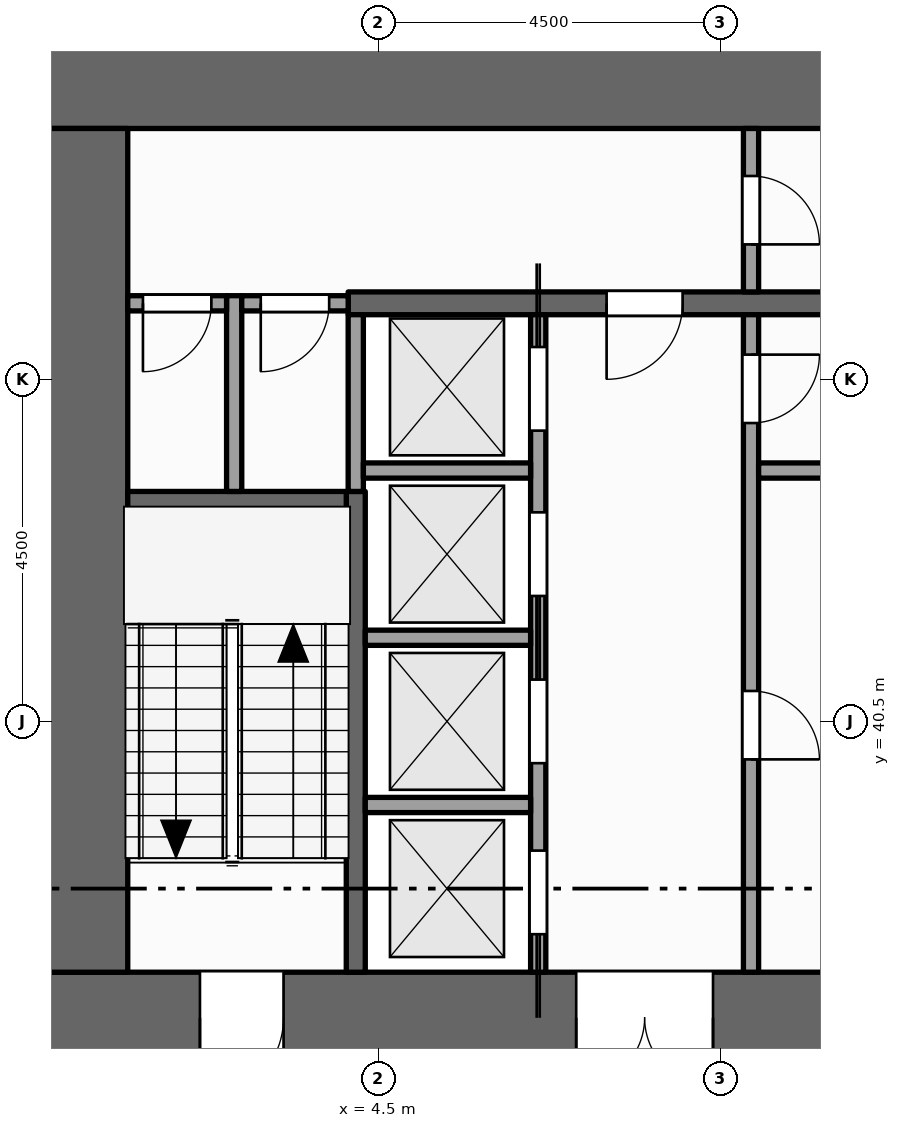
"""IFC4 building model, lengths in metres.
Left out: names, types, materials, properties, quantities, classifications, styles, units other than length and angle.
Written with IfcOpenShell. Run it as: python <this file> out.ifc"""

import sys

from ifc_helpers import new_model, si_unit, direction, frame, frame_2d, origin, place, context, subcontext, project, spatial, rectangle, extrude, element, fill, save


model = new_model("IFC4")
c1 = context("Model", 3, precision=1e-05, world=origin(), true_north=direction((0.0, 1.0)))
c2 = subcontext(c1, "Body", "Model", "MODEL_VIEW")
j1 = project(units=[si_unit("LENGTHUNIT", "METRE"), si_unit("PLANEANGLEUNIT", "RADIAN")], contexts=[c1])
p1 = place(None, origin())
s1 = spatial("IfcSite", under=j1, at=p1, CompositionType="ELEMENT")
p2 = place(p1, origin())
s2 = spatial("IfcBuilding", under=s1, at=p2, CompositionType="ELEMENT")
p3 = place(p2, frame((0.0, 0.0, 119.0)))
s3 = spatial("IfcBuildingStorey", under=s2, at=p3, CompositionType="ELEMENT", Elevation=119.0)
p4 = place(p3, frame((0.0, 36.6, -0.15), z_axis=(0.0, 0.0, 1.0), x_axis=(1.0, 0.0, 0.0)))
e1 = element("IfcWall", 1, at=p4, inside=s3, PredefinedType="SHEAR", context=c2, shape_type="SweptSolid", body=[
    extrude(rectangle(XDim=22.5, YDim=1.2, at=frame_2d((11.25, 0.0))), origin(), (0.0, 0.0, 1.0), 4.0),
])
p5 = place(p4, frame((7.1, 0.0, 0.15)))
e2 = element("IfcOpeningElement", 2, at=p5, cuts=e1, PredefinedType="OPENING", context=c2, shape_type="SweptSolid", body=[
    extrude(rectangle(XDim=1.8, YDim=2.1, at=frame_2d((0.9, 1.05))), frame((0.0, 0.61, 0.0), z_axis=(0.0, -1.0, 0.0), x_axis=(1.0, 0.0, 0.0)), (0.0, 0.0, 1.0), 1.22),
])
p6 = place(p4, frame((13.15, 0.0, 0.15)))
e3 = element("IfcOpeningElement", 3, at=p6, cuts=e1, PredefinedType="OPENING", context=c2, shape_type="SweptSolid", body=[
    extrude(rectangle(XDim=1.1, YDim=2.1, at=frame_2d((0.55, 1.05))), frame((0.0, 0.61, 0.0), z_axis=(0.0, -1.0, 0.0), x_axis=(1.0, 0.0, 0.0)), (0.0, 0.0, 1.0), 1.22),
])
p7 = place(p4, frame((2.15, 0.0, 0.15)))
e4 = element("IfcOpeningElement", 4, at=p7, cuts=e1, PredefinedType="OPENING", context=c2, shape_type="SweptSolid", body=[
    extrude(rectangle(XDim=1.1, YDim=2.1, at=frame_2d((0.55, 1.05))), frame((0.0, 0.61, 0.0), z_axis=(0.0, -1.0, 0.0), x_axis=(1.0, 0.0, 0.0)), (0.0, 0.0, 1.0), 1.22),
])
p8 = place(p4, frame((19.35, 0.0, 0.15)))
e5 = element("IfcOpeningElement", 5, at=p8, cuts=e1, PredefinedType="OPENING", context=c2, shape_type="SweptSolid", body=[
    extrude(rectangle(XDim=1.1, YDim=2.1, at=frame_2d((0.55, 1.05))), frame((0.0, 0.61, 0.0), z_axis=(0.0, -1.0, 0.0), x_axis=(1.0, 0.0, 0.0)), (0.0, 0.0, 1.0), 1.22),
])
p9 = place(p3, frame((0.0, 48.9, -0.15), z_axis=(0.0, 0.0, 1.0), x_axis=(1.0, 0.0, 0.0)))
e6 = element("IfcWall", 6, at=p9, inside=s3, PredefinedType="SHEAR", context=c2, shape_type="SweptSolid", body=[
    extrude(rectangle(XDim=22.5, YDim=1.2, at=frame_2d((11.25, 0.0))), origin(), (0.0, 0.0, 1.0), 4.0),
])
p10 = place(p3, frame((0.6, 37.2, -0.15), z_axis=(0.0, 0.0, 1.0), x_axis=(0.0, 1.0, 0.0)))
e7 = element("IfcWall", 7, at=p10, inside=s3, PredefinedType="SHEAR", context=c2, shape_type="SweptSolid", body=[
    extrude(rectangle(XDim=11.1, YDim=1.2, at=frame_2d((5.55, 0.0))), origin(), (0.0, 0.0, 1.0), 4.0),
])
p11 = place(p3, frame((2.6, 43.525, 0.0), z_axis=(0.0, 0.0, 1.0), x_axis=(0.0, 1.0, 0.0)))
e8 = element("IfcWall", 8, at=p11, inside=s3, PredefinedType="PARTITIONING", context=c2, shape_type="SweptSolid", body=[
    extrude(rectangle(XDim=2.575, YDim=0.2, at=frame_2d((1.288, 0.0))), origin(), (0.0, 0.0, 1.0), 3.85),
])
p12 = place(p3, frame((4.2, 37.2, 0.0), z_axis=(0.0, 0.0, 1.0), x_axis=(0.0, 1.0, 0.0)))
e9 = element("IfcWall", 9, at=p12, inside=s3, PredefinedType="SHEAR", context=c2, shape_type="SweptSolid", body=[
    extrude(rectangle(XDim=6.325, YDim=0.25, at=frame_2d((3.163, 0.0))), origin(), (0.0, 0.0, 1.0), 3.85),
])
p13 = place(p3, frame((4.2, 43.525, 0.0), z_axis=(0.0, 0.0, 1.0), x_axis=(0.0, 1.0, 0.0)))
e10 = element("IfcWall", 10, at=p13, inside=s3, PredefinedType="SOLIDWALL", context=c2, shape_type="SweptSolid", body=[
    extrude(rectangle(XDim=2.325, YDim=0.2, at=frame_2d((1.163, 0.0))), origin(), (0.0, 0.0, 1.0), 3.85),
])
p14 = place(p3, frame((6.6, 37.2, 0.0), z_axis=(0.0, 0.0, 1.0), x_axis=(0.0, 1.0, 0.0)))
e11 = element("IfcWall", 11, at=p14, inside=s3, PredefinedType="SOLIDWALL", context=c2, shape_type="SweptSolid", body=[
    extrude(rectangle(XDim=8.65, YDim=0.2, at=frame_2d((4.325, 0.0))), origin(), (0.0, 0.0, 1.0), 3.85),
])
p15 = place(p14, frame((0.5, 0.0, 0.012)))
e12 = element("IfcOpeningElement", 12, at=p15, cuts=e11, PredefinedType="OPENING", context=c2, shape_type="SweptSolid", body=[
    extrude(rectangle(XDim=1.1, YDim=2.1, at=frame_2d((0.55, 1.05))), frame((0.0, 0.11, 0.0), z_axis=(0.0, -1.0, 0.0), x_axis=(1.0, 0.0, 0.0)), (0.0, 0.0, 1.0), 0.22),
])
p16 = place(p14, frame((2.75, 0.0, 0.012)))
e13 = element("IfcOpeningElement", 13, at=p16, cuts=e11, PredefinedType="OPENING", context=c2, shape_type="SweptSolid", body=[
    extrude(rectangle(XDim=1.1, YDim=2.1, at=frame_2d((0.55, 1.05))), frame((0.0, 0.11, 0.0), z_axis=(0.0, -1.0, 0.0), x_axis=(1.0, 0.0, 0.0)), (0.0, 0.0, 1.0), 0.22),
])
p17 = place(p14, frame((4.95, 0.0, 0.012)))
e14 = element("IfcOpeningElement", 14, at=p17, cuts=e11, PredefinedType="OPENING", context=c2, shape_type="SweptSolid", body=[
    extrude(rectangle(XDim=1.1, YDim=2.1, at=frame_2d((0.55, 1.05))), frame((0.0, 0.11, 0.0), z_axis=(0.0, -1.0, 0.0), x_axis=(1.0, 0.0, 0.0)), (0.0, 0.0, 1.0), 0.22),
])
p18 = place(p14, frame((7.125, 0.0, 0.012)))
e15 = element("IfcOpeningElement", 15, at=p18, cuts=e11, PredefinedType="OPENING", context=c2, shape_type="SweptSolid", body=[
    extrude(rectangle(XDim=1.1, YDim=2.1, at=frame_2d((0.55, 1.05))), frame((0.0, 0.11, 0.0), z_axis=(0.0, -1.0, 0.0), x_axis=(1.0, 0.0, 0.0)), (0.0, 0.0, 1.0), 0.22),
])
p19 = place(p3, frame((9.4, 37.2, 0.0), z_axis=(0.0, 0.0, 1.0), x_axis=(0.0, 1.0, 0.0)))
e16 = element("IfcWall", 16, at=p19, inside=s3, PredefinedType="PARTITIONING", context=c2, shape_type="SweptSolid", body=[
    extrude(rectangle(XDim=8.65, YDim=0.2, at=frame_2d((4.325, 0.0))), origin(), (0.0, 0.0, 1.0), 3.85),
])
p20 = place(p19, frame((2.8, 0.0, 0.0)))
e17 = element("IfcOpeningElement", 17, at=p20, cuts=e16, PredefinedType="OPENING", context=c2, shape_type="SweptSolid", body=[
    extrude(rectangle(XDim=0.9, YDim=2.1, at=frame_2d((0.45, 1.05))), frame((0.0, 0.11, 0.0), z_axis=(0.0, -1.0, 0.0), x_axis=(1.0, 0.0, 0.0)), (0.0, 0.0, 1.0), 0.22),
])
p21 = place(p19, frame((7.225, 0.0, 0.0)))
e18 = element("IfcOpeningElement", 18, at=p21, cuts=e16, PredefinedType="OPENING", context=c2, shape_type="SweptSolid", body=[
    extrude(rectangle(XDim=0.9, YDim=2.1, at=frame_2d((0.45, 1.05))), frame((0.0, 0.11, 0.0), z_axis=(0.0, -1.0, 0.0), x_axis=(1.0, 0.0, 0.0)), (0.0, 0.0, 1.0), 0.22),
])
p22 = place(p3, frame((9.4, 46.15, 0.0), z_axis=(0.0, 0.0, 1.0), x_axis=(0.0, 1.0, 0.0)))
e19 = element("IfcWall", 19, at=p22, inside=s3, PredefinedType="PARTITIONING", context=c2, shape_type="SweptSolid", body=[
    extrude(rectangle(XDim=2.15, YDim=0.2, at=frame_2d((1.075, 0.0))), origin(), (0.0, 0.0, 1.0), 3.85),
])
p23 = place(p22, frame((0.625, 0.0, 0.0)))
e20 = element("IfcOpeningElement", 20, at=p23, cuts=e19, PredefinedType="OPENING", context=c2, shape_type="SweptSolid", body=[
    extrude(rectangle(XDim=0.9, YDim=2.1, at=frame_2d((0.45, 1.05))), frame((0.0, 0.11, 0.0), z_axis=(0.0, -1.0, 0.0), x_axis=(1.0, 0.0, 0.0)), (0.0, 0.0, 1.0), 0.22),
])
for number, where, z_axis, x_axis in (
    (21, (4.325, 39.4, 0.0), (0.0, 0.0, 1.0), (1.0, 0.0, 0.0)),
    (22, (4.325, 41.6, 0.0), (0.0, 0.0, 1.0), (1.0, 0.0, 0.0)),
):
    element("IfcWall", number, at=place(p3, frame(where, z_axis=z_axis, x_axis=x_axis)), inside=s3, PredefinedType="SOLIDWALL", context=c2, shape_type="SweptSolid", body=[
        extrude(rectangle(XDim=2.175, YDim=0.2, at=frame_2d((1.087, 0.0))), origin(), (0.0, 0.0, 1.0), 3.85),
    ])
p24 = place(p3, frame((1.2, 43.4, 0.0), z_axis=(0.0, 0.0, 1.0), x_axis=(1.0, 0.0, 0.0)))
e23 = element("IfcWall", 23, at=p24, inside=s3, PredefinedType="SHEAR", context=c2, shape_type="SweptSolid", body=[
    extrude(rectangle(XDim=2.875, YDim=0.25, at=frame_2d((1.438, 0.0))), origin(), (0.0, 0.0, 1.0), 3.85),
])
p25 = place(p3, frame((4.3, 43.8, 0.0), z_axis=(0.0, 0.0, 1.0), x_axis=(1.0, 0.0, 0.0)))
e24 = element("IfcWall", 24, at=p25, inside=s3, PredefinedType="SOLIDWALL", context=c2, shape_type="SweptSolid", body=[
    extrude(rectangle(XDim=2.2, YDim=0.2, at=frame_2d((1.1, 0.0))), origin(), (0.0, 0.0, 1.0), 3.85),
])
p26 = place(p3, frame((9.5, 43.8, 0.0), z_axis=(0.0, 0.0, 1.0), x_axis=(1.0, 0.0, 0.0)))
e25 = element("IfcWall", 25, at=p26, inside=s3, PredefinedType="PARTITIONING", context=c2, shape_type="SweptSolid", body=[
    extrude(rectangle(XDim=2.2, YDim=0.2, at=frame_2d((1.1, 0.0))), origin(), (0.0, 0.0, 1.0), 3.85),
])
p27 = place(p3, frame((1.2, 46.0, 0.0), z_axis=(0.0, 0.0, 1.0), x_axis=(1.0, 0.0, 0.0)))
e26 = element("IfcWall", 26, at=p27, inside=s3, PredefinedType="PARTITIONING", context=c2, shape_type="SweptSolid", body=[
    extrude(rectangle(XDim=1.3, YDim=0.2, at=frame_2d((0.65, 0.0))), origin(), (0.0, 0.0, 1.0), 3.85),
])
p28 = place(p27, frame((0.2, 0.0, 0.0)))
e27 = element("IfcOpeningElement", 27, at=p28, cuts=e26, PredefinedType="OPENING", context=c2, shape_type="SweptSolid", body=[
    extrude(rectangle(XDim=0.9, YDim=2.1, at=frame_2d((0.45, 1.05))), frame((0.0, 0.11, 0.0), z_axis=(0.0, -1.0, 0.0), x_axis=(1.0, 0.0, 0.0)), (0.0, 0.0, 1.0), 0.22),
])
p29 = place(p3, frame((2.7, 46.0, 0.0), z_axis=(0.0, 0.0, 1.0), x_axis=(1.0, 0.0, 0.0)))
e28 = element("IfcWall", 28, at=p29, inside=s3, PredefinedType="PARTITIONING", context=c2, shape_type="SweptSolid", body=[
    extrude(rectangle(XDim=1.4, YDim=0.2, at=frame_2d((0.7, 0.0))), origin(), (0.0, 0.0, 1.0), 3.85),
])
p30 = place(p29, frame((0.25, 0.0, 0.0)))
e29 = element("IfcOpeningElement", 29, at=p30, cuts=e28, PredefinedType="OPENING", context=c2, shape_type="SweptSolid", body=[
    extrude(rectangle(XDim=0.9, YDim=2.1, at=frame_2d((0.45, 1.05))), frame((0.0, 0.11, 0.0), z_axis=(0.0, -1.0, 0.0), x_axis=(1.0, 0.0, 0.0)), (0.0, 0.0, 1.0), 0.22),
])
p31 = place(p3, frame((4.1, 46.0, 0.0), z_axis=(0.0, 0.0, 1.0), x_axis=(1.0, 0.0, 0.0)))
e30 = element("IfcWall", 30, at=p31, inside=s3, PredefinedType="SHEAR", context=c2, shape_type="SweptSolid", body=[
    extrude(rectangle(XDim=14.5, YDim=0.3, at=frame_2d((7.25, 0.0))), origin(), (0.0, 0.0, 1.0), 3.85),
])
p32 = place(p31, frame((3.4, 0.0, 0.0)))
e31 = element("IfcOpeningElement", 31, at=p32, cuts=e30, PredefinedType="OPENING", context=c2, shape_type="SweptSolid", body=[
    extrude(rectangle(XDim=1.0, YDim=2.1, at=frame_2d((0.5, 1.05))), frame((0.0, 0.16, 0.0), z_axis=(0.0, -1.0, 0.0), x_axis=(1.0, 0.0, 0.0)), (0.0, 0.0, 1.0), 0.32),
])
p33 = place(p31, frame((9.1, 0.0, 0.0)))
e32 = element("IfcOpeningElement", 32, at=p33, cuts=e30, PredefinedType="OPENING", context=c2, shape_type="SweptSolid", body=[
    extrude(rectangle(XDim=1.0, YDim=2.1, at=frame_2d((0.5, 1.05))), frame((0.0, 0.16, 0.0), z_axis=(0.0, -1.0, 0.0), x_axis=(1.0, 0.0, 0.0)), (0.0, 0.0, 1.0), 0.32),
])
p34 = place(p15, origin())
e33 = element("IfcDoor", 33, at=p34, inside=s3, OperationType="SLIDING_TO_LEFT", PredefinedType="DOOR", context=c2, shape_type="SweptSolid", body=[
    extrude(rectangle(XDim=1.1, YDim=2.1, at=frame_2d((0.55, 1.05))), frame((0.0, 0.025, 0.0), z_axis=(0.0, -1.0, 0.0), x_axis=(1.0, 0.0, 0.0)), (0.0, 0.0, 1.0), 0.05),
])
fill(e12, e33)
p35 = place(p16, origin())
e34 = element("IfcDoor", 34, at=p35, inside=s3, OperationType="SLIDING_TO_RIGHT", PredefinedType="DOOR", context=c2, shape_type="SweptSolid", body=[
    extrude(rectangle(XDim=1.1, YDim=2.1, at=frame_2d((0.55, 1.05))), frame((0.0, 0.025, 0.0), z_axis=(0.0, -1.0, 0.0), x_axis=(1.0, 0.0, 0.0)), (0.0, 0.0, 1.0), 0.05),
])
fill(e13, e34)
p36 = place(p17, origin())
e35 = element("IfcDoor", 35, at=p36, inside=s3, OperationType="SLIDING_TO_LEFT", PredefinedType="DOOR", context=c2, shape_type="SweptSolid", body=[
    extrude(rectangle(XDim=1.1, YDim=2.1, at=frame_2d((0.55, 1.05))), frame((0.0, 0.025, 0.0), z_axis=(0.0, -1.0, 0.0), x_axis=(1.0, 0.0, 0.0)), (0.0, 0.0, 1.0), 0.05),
])
fill(e14, e35)
p37 = place(p18, origin())
e36 = element("IfcDoor", 36, at=p37, inside=s3, OperationType="SLIDING_TO_RIGHT", PredefinedType="DOOR", context=c2, shape_type="SweptSolid", body=[
    extrude(rectangle(XDim=1.1, YDim=2.1, at=frame_2d((0.55, 1.05))), frame((0.0, 0.025, 0.0), z_axis=(0.0, -1.0, 0.0), x_axis=(1.0, 0.0, 0.0)), (0.0, 0.0, 1.0), 0.05),
])
fill(e15, e36)
p38 = place(p5, origin())
e37 = element("IfcDoor", 37, at=p38, inside=s3, OperationType="DOUBLE_DOOR_SINGLE_SWING", PredefinedType="DOOR", context=c2, shape_type="SweptSolid", body=[
    extrude(rectangle(XDim=1.8, YDim=2.1, at=frame_2d((0.9, 1.05))), frame((0.0, 0.025, 0.0), z_axis=(0.0, -1.0, 0.0), x_axis=(1.0, 0.0, 0.0)), (0.0, 0.0, 1.0), 0.05),
])
fill(e2, e37)
p39 = place(p32, origin())
e38 = element("IfcDoor", 38, at=p39, inside=s3, OperationType="SINGLE_SWING_LEFT", PredefinedType="DOOR", context=c2, shape_type="SweptSolid", body=[
    extrude(rectangle(XDim=1.0, YDim=2.1, at=frame_2d((0.5, 1.05))), frame((0.0, 0.025, 0.0), z_axis=(0.0, -1.0, 0.0), x_axis=(1.0, 0.0, 0.0)), (0.0, 0.0, 1.0), 0.05),
])
fill(e31, e38)
p40 = place(p23, origin())
e39 = element("IfcDoor", 39, at=p40, inside=s3, OperationType="SINGLE_SWING_LEFT", PredefinedType="DOOR", context=c2, shape_type="SweptSolid", body=[
    extrude(rectangle(XDim=0.9, YDim=2.1, at=frame_2d((0.45, 1.05))), frame((0.0, 0.025, 0.0), z_axis=(0.0, -1.0, 0.0), x_axis=(1.0, 0.0, 0.0)), (0.0, 0.0, 1.0), 0.05),
])
fill(e20, e39)
p41 = place(p7, origin())
e40 = element("IfcDoor", 40, at=p41, inside=s3, OperationType="SINGLE_SWING_LEFT", PredefinedType="DOOR", context=c2, shape_type="SweptSolid", body=[
    extrude(rectangle(XDim=1.1, YDim=2.1, at=frame_2d((0.55, 1.05))), frame((0.0, 0.025, 0.0), z_axis=(0.0, -1.0, 0.0), x_axis=(1.0, 0.0, 0.0)), (0.0, 0.0, 1.0), 0.05),
])
fill(e4, e40)
p42 = place(p28, origin())
e41 = element("IfcDoor", 41, at=p42, inside=s3, OperationType="SINGLE_SWING_LEFT", PredefinedType="DOOR", context=c2, shape_type="SweptSolid", body=[
    extrude(rectangle(XDim=0.9, YDim=2.1, at=frame_2d((0.45, 1.05))), frame((0.0, 0.025, 0.0), z_axis=(0.0, -1.0, 0.0), x_axis=(1.0, 0.0, 0.0)), (0.0, 0.0, 1.0), 0.05),
])
fill(e27, e41)
p43 = place(p30, origin())
e42 = element("IfcDoor", 42, at=p43, inside=s3, OperationType="SINGLE_SWING_LEFT", PredefinedType="DOOR", context=c2, shape_type="SweptSolid", body=[
    extrude(rectangle(XDim=0.9, YDim=2.1, at=frame_2d((0.45, 1.05))), frame((0.0, 0.025, 0.0), z_axis=(0.0, -1.0, 0.0), x_axis=(1.0, 0.0, 0.0)), (0.0, 0.0, 1.0), 0.05),
])
fill(e29, e42)
p44 = place(p20, origin())
e43 = element("IfcDoor", 43, at=p44, inside=s3, OperationType="SINGLE_SWING_LEFT", PredefinedType="DOOR", context=c2, shape_type="SweptSolid", body=[
    extrude(rectangle(XDim=0.9, YDim=2.1, at=frame_2d((0.45, 1.05))), frame((0.0, 0.025, 0.0), z_axis=(0.0, -1.0, 0.0), x_axis=(1.0, 0.0, 0.0)), (0.0, 0.0, 1.0), 0.05),
])
fill(e17, e43)
p45 = place(p21, origin())
e44 = element("IfcDoor", 44, at=p45, inside=s3, OperationType="SINGLE_SWING_RIGHT", PredefinedType="DOOR", context=c2, shape_type="SweptSolid", body=[
    extrude(rectangle(XDim=0.9, YDim=2.1, at=frame_2d((0.45, 1.05))), frame((0.0, 0.025, 0.0), z_axis=(0.0, -1.0, 0.0), x_axis=(1.0, 0.0, 0.0)), (0.0, 0.0, 1.0), 0.05),
])
fill(e18, e44)
save(model, sys.argv[1])
